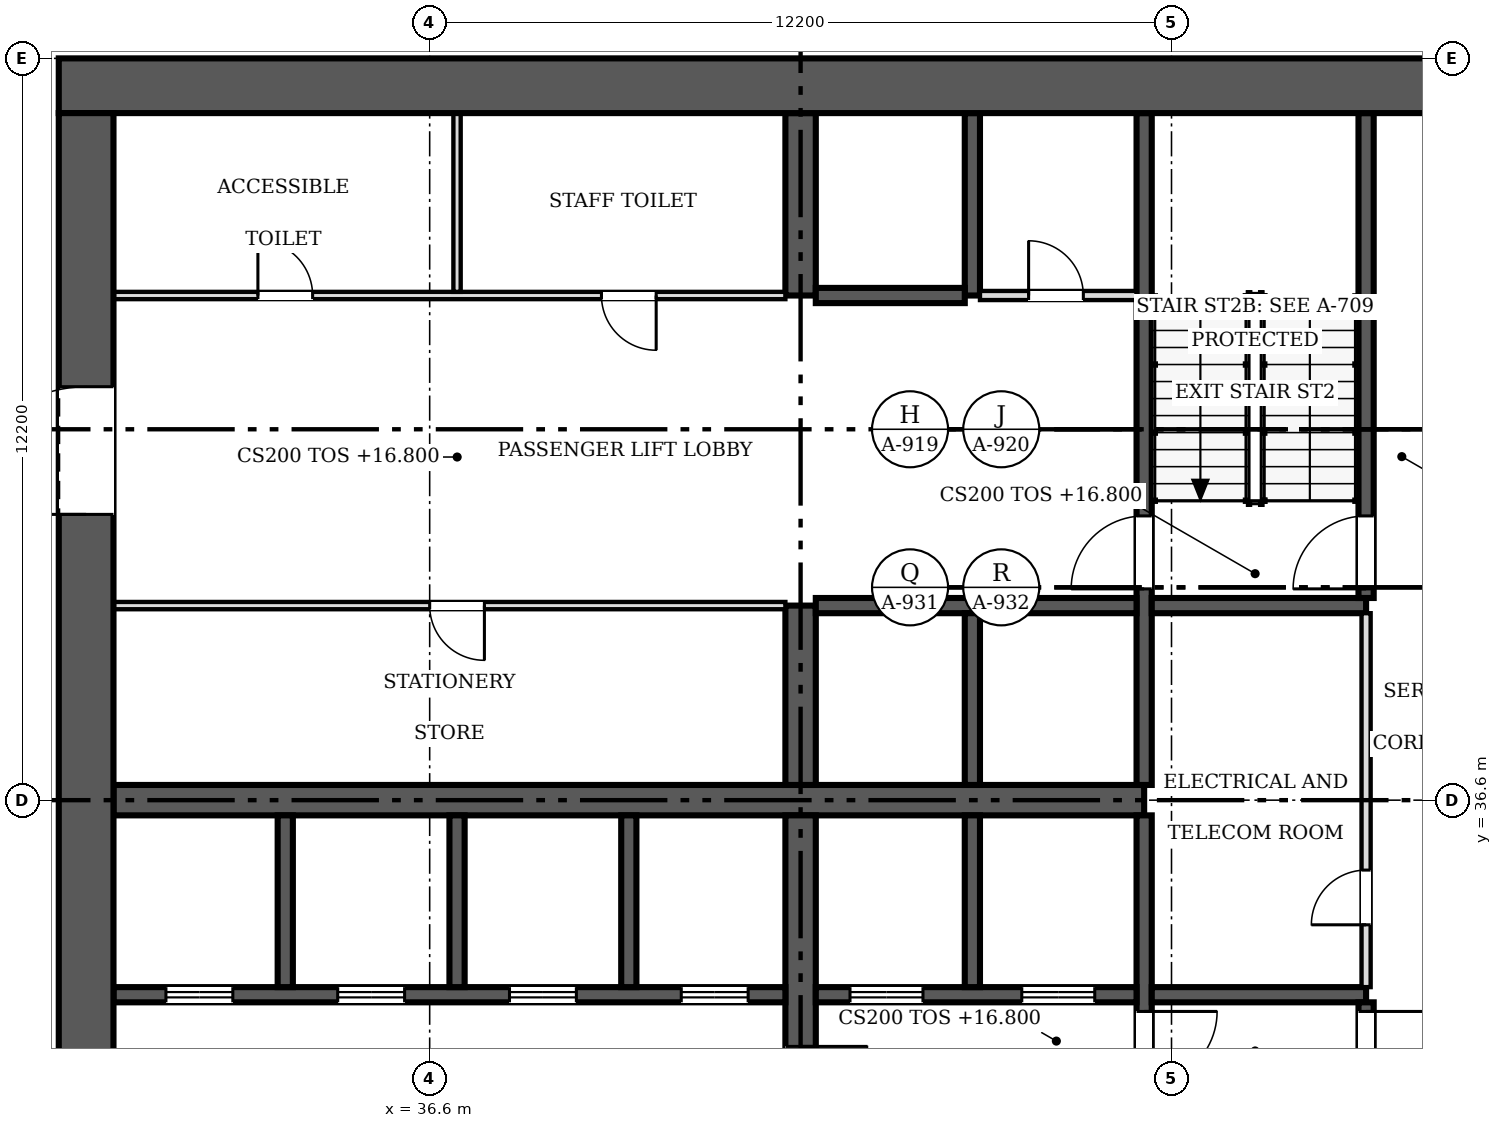
"""IFC4 building model, lengths in metres.
Left out: names, types, materials, properties, quantities, classifications, styles, units other than length and angle.
Written with IfcOpenShell. Run it as: python <this file> out.ifc"""

import sys

from ifc_helpers import new_model, si_unit, direction, frame, frame_2d, origin, place, context, subcontext, project, spatial, rectangle, extrude, source, transform, mapped, element, fill, save


model = new_model("IFC4")
c1 = context("Model", 3, precision=1e-05, world=origin(), true_north=direction((0.0, 1.0)))
c2 = subcontext(c1, "Body", "Model", "MODEL_VIEW")
j1 = project(units=[si_unit("LENGTHUNIT", "METRE"), si_unit("PLANEANGLEUNIT", "RADIAN")], contexts=[c1])
p1 = place(None, origin())
s1 = spatial("IfcSite", under=j1, at=p1, CompositionType="ELEMENT")
p2 = place(p1, origin())
s2 = spatial("IfcBuilding", under=s1, at=p2, CompositionType="ELEMENT")
p3 = place(p2, frame((0.0, 0.0, 16.8)))
s3 = spatial("IfcBuildingStorey", under=s2, at=p3, CompositionType="ELEMENT", Elevation=16.8)
p4 = place(p3, frame((30.95, 25.3, 0.0), z_axis=(0.0, 0.0, 1.0), x_axis=(0.0, 1.0, 0.0)))
e1 = element("IfcWall", 1, at=p4, inside=s3, PredefinedType="SHEAR", context=c2, shape_type="SweptSolid", body=[
    extrude(rectangle(XDim=22.6, YDim=0.9, at=frame_2d((11.3, 0.0))), origin(), (0.0, 0.0, 1.0), 4.5),
])
m1 = source(origin(), c2, "Body", "SweptSolid", [
    extrude(rectangle(XDim=2.1, YDim=2.4, at=frame_2d((1.05, 1.2))), frame((0.0, 0.46, 0.0), z_axis=(0.0, -1.0, 0.0), x_axis=(1.0, 0.0, 0.0)), (0.0, 0.0, 1.0), 0.92),
])
p5 = place(p4, frame((4.5, 0.0, 0.0)))
e2 = element("IfcOpeningElement", 2, at=p5, cuts=e1, PredefinedType="OPENING", context=c2, shape_type="MappedRepresentation", body=[
    mapped(m1, transform((0.0, 0.0, 0.0), scale=1.0)),
])
p6 = place(p4, frame((16.0, 0.0, 0.0)))
e3 = element("IfcOpeningElement", 3, at=p6, cuts=e1, PredefinedType="OPENING", context=c2, shape_type="MappedRepresentation", body=[
    mapped(m1, transform((0.0, 0.0, 0.0), scale=1.0)),
])
p7 = place(p3, frame((30.5, 48.35, 0.0), z_axis=(0.0, 0.0, 1.0), x_axis=(1.0, 0.0, 0.0)))
e4 = element("IfcWall", 4, at=p7, inside=s3, PredefinedType="SHEAR", context=c2, shape_type="SweptSolid", body=[
    extrude(rectangle(XDim=24.4, YDim=0.9, at=frame_2d((12.2, 0.0))), origin(), (0.0, 0.0, 1.0), 4.5),
])
p8 = place(p3, frame((31.4, 36.6, 0.0), z_axis=(0.0, 0.0, 1.0), x_axis=(1.0, 0.0, 0.0)))
e5 = element("IfcWall", 5, at=p8, inside=s3, PredefinedType="SHEAR", context=c2, shape_type="SweptSolid", body=[
    extrude(rectangle(XDim=16.95, YDim=0.5, at=frame_2d((8.475, 0.0))), origin(), (0.0, 0.0, 1.0), 4.5),
])
p9 = place(p3, frame((42.7, 36.35, 0.0), z_axis=(0.0, 0.0, 1.0), x_axis=(0.0, -1.0, 0.0)))
e6 = element("IfcWall", 6, at=p9, inside=s3, PredefinedType="SHEAR", context=c2, shape_type="SweptSolid", body=[
    extrude(rectangle(XDim=11.05, YDim=0.5, at=frame_2d((5.525, 0.0))), origin(), (0.0, 0.0, 1.0), 4.5),
])
m2 = source(origin(), c2, "Body", "SweptSolid", [
    extrude(rectangle(XDim=0.9, YDim=2.1, at=frame_2d((0.45, 1.05))), frame((0.0, 0.26, 0.0), z_axis=(0.0, -1.0, 0.0), x_axis=(1.0, 0.0, 0.0)), (0.0, 0.0, 1.0), 0.52),
])
p10 = place(p9, frame((6.5, 0.0, 0.0)))
e7 = element("IfcOpeningElement", 7, at=p10, cuts=e6, PredefinedType="OPENING", context=c2, shape_type="MappedRepresentation", body=[
    mapped(m2, transform((0.0, 0.0, 0.0), scale=1.0)),
])
m3 = source(origin(), c2, "Body", "SweptSolid", [
    extrude(rectangle(XDim=1.1, YDim=2.1, at=frame_2d((0.55, 1.05))), frame((0.0, 0.26, 0.0), z_axis=(0.0, -1.0, 0.0), x_axis=(1.0, 0.0, 0.0)), (0.0, 0.0, 1.0), 0.52),
])
p11 = place(p9, frame((3.8, 0.0, 0.0)))
e8 = element("IfcOpeningElement", 8, at=p11, cuts=e6, PredefinedType="OPENING", context=c2, shape_type="MappedRepresentation", body=[
    mapped(m3, transform((0.0, 0.0, 0.0), scale=1.0)),
])
p12 = place(p3, frame((42.7, 36.85, 0.0), z_axis=(0.0, 0.0, 1.0), x_axis=(0.0, 1.0, 0.0)))
e9 = element("IfcWall", 9, at=p12, inside=s3, PredefinedType="SHEAR", context=c2, shape_type="SweptSolid", body=[
    extrude(rectangle(XDim=2.95, YDim=0.5, at=frame_2d((1.475, 0.0))), origin(), (0.0, 0.0, 1.0), 4.5),
])
p13 = place(p3, frame((42.7, 44.9, 0.0), z_axis=(0.0, 0.0, 1.0), x_axis=(0.0, 1.0, 0.0)))
e10 = element("IfcWall", 10, at=p13, inside=s3, PredefinedType="SHEAR", context=c2, shape_type="SweptSolid", body=[
    extrude(rectangle(XDim=3.0, YDim=0.5, at=frame_2d((1.5, 0.0))), origin(), (0.0, 0.0, 1.0), 4.5),
])
p14 = place(p3, frame((48.35, 36.35, 0.0), z_axis=(0.0, 0.0, 1.0), x_axis=(0.0, -1.0, 0.0)))
e11 = element("IfcWall", 11, at=p14, inside=s3, PredefinedType="SOLIDWALL", context=c2, shape_type="SweptSolid", body=[
    extrude(rectangle(XDim=11.05, YDim=0.25, at=frame_2d((5.525, 0.0))), origin(), (0.0, 0.0, 1.0), 4.5),
])
m4 = source(origin(), c2, "Body", "SweptSolid", [
    extrude(rectangle(XDim=1.2, YDim=2.1, at=frame_2d((0.6, 1.05))), frame((0.0, 0.135, 0.0), z_axis=(0.0, -1.0, 0.0), x_axis=(1.0, 0.0, 0.0)), (0.0, 0.0, 1.0), 0.27),
])
p15 = place(p14, frame((3.225, 0.0, 0.0)))
e12 = element("IfcOpeningElement", 12, at=p15, cuts=e11, PredefinedType="OPENING", context=c2, shape_type="MappedRepresentation", body=[
    mapped(m4, transform((0.0, 0.0, 0.0), scale=1.0)),
])
p16 = place(p3, frame((48.35, 47.9, 0.0), z_axis=(0.0, 0.0, 1.0), x_axis=(0.0, -1.0, 0.0)))
e13 = element("IfcWall", 13, at=p16, inside=s3, PredefinedType="SOLIDWALL", context=c2, shape_type="SweptSolid", body=[
    extrude(rectangle(XDim=11.05, YDim=0.25, at=frame_2d((5.525, 0.0))), origin(), (0.0, 0.0, 1.0), 4.5),
])
p17 = place(p16, frame((6.625, 0.0, 0.0)))
e14 = element("IfcOpeningElement", 14, at=p17, cuts=e13, PredefinedType="OPENING", context=c2, shape_type="MappedRepresentation", body=[
    mapped(m4, transform((0.0, 0.0, 0.0), scale=1.0)),
])
p18 = place(p3, frame((42.45, 33.4, 0.0), z_axis=(0.0, 0.0, 1.0), x_axis=(-1.0, 0.0, 0.0)))
e15 = element("IfcWall", 15, at=p18, inside=s3, PredefinedType="SOLIDWALL", context=c2, shape_type="SweptSolid", body=[
    extrude(rectangle(XDim=11.05, YDim=0.25, at=frame_2d((5.525, 0.0))), origin(), (0.0, 0.0, 1.0), 4.5),
])
m5 = source(origin(), c2, "Body", "SweptSolid", [
    extrude(rectangle(XDim=1.1, YDim=2.1, at=frame_2d((0.55, 1.05))), frame((0.0, 0.135, 0.0), z_axis=(0.0, -1.0, 0.0), x_axis=(1.0, 0.0, 0.0)), (0.0, 0.0, 1.0), 0.27),
])
p19 = place(p18, frame((9.087, 0.0, 0.0)))
e16 = element("IfcOpeningElement", 16, at=p19, cuts=e15, PredefinedType="OPENING", context=c2, shape_type="MappedRepresentation", body=[
    mapped(m5, transform((0.0, 0.0, 0.0), scale=1.0)),
])
p20 = place(p18, frame((6.262, 0.0, 0.0)))
e17 = element("IfcOpeningElement", 17, at=p20, cuts=e15, PredefinedType="OPENING", context=c2, shape_type="MappedRepresentation", body=[
    mapped(m5, transform((0.0, 0.0, 0.0), scale=1.0)),
])
p21 = place(p18, frame((3.438, 0.0, 0.0)))
e18 = element("IfcOpeningElement", 18, at=p21, cuts=e15, PredefinedType="OPENING", context=c2, shape_type="MappedRepresentation", body=[
    mapped(m5, transform((0.0, 0.0, 0.0), scale=1.0)),
])
p22 = place(p18, frame((0.613, 0.0, 0.0)))
e19 = element("IfcOpeningElement", 19, at=p22, cuts=e15, PredefinedType="OPENING", context=c2, shape_type="MappedRepresentation", body=[
    mapped(m5, transform((0.0, 0.0, 0.0), scale=1.0)),
])
p23 = place(p3, frame((48.225, 33.4, 0.0), z_axis=(0.0, 0.0, 1.0), x_axis=(-1.0, 0.0, 0.0)))
e20 = element("IfcWall", 20, at=p23, inside=s3, PredefinedType="SOLIDWALL", context=c2, shape_type="SweptSolid", body=[
    extrude(rectangle(XDim=5.275, YDim=0.25, at=frame_2d((2.638, 0.0))), origin(), (0.0, 0.0, 1.0), 4.5),
])
p24 = place(p23, frame((3.512, 0.0, 0.0)))
e21 = element("IfcOpeningElement", 21, at=p24, cuts=e20, PredefinedType="OPENING", context=c2, shape_type="MappedRepresentation", body=[
    mapped(m4, transform((0.0, 0.0, 0.0), scale=1.0)),
])
p25 = place(p23, frame((0.688, 0.0, 0.0)))
e22 = element("IfcOpeningElement", 22, at=p25, cuts=e20, PredefinedType="OPENING", context=c2, shape_type="MappedRepresentation", body=[
    mapped(m4, transform((0.0, 0.0, 0.0), scale=1.0)),
])
p26 = place(p3, frame((48.475, 33.4, 0.0), z_axis=(0.0, 0.0, 1.0), x_axis=(1.0, 0.0, 0.0)))
e23 = element("IfcWall", 23, at=p26, inside=s3, PredefinedType="SOLIDWALL", context=c2, shape_type="SweptSolid", body=[
    extrude(rectangle(XDim=3.525, YDim=0.25, at=frame_2d((1.762, 0.0))), origin(), (0.0, 0.0, 1.0), 4.5),
])
p27 = place(p3, frame((42.95, 39.8, 0.0), z_axis=(0.0, 0.0, 1.0), x_axis=(1.0, 0.0, 0.0)))
e24 = element("IfcWall", 24, at=p27, inside=s3, PredefinedType="SOLIDWALL", context=c2, shape_type="SweptSolid", body=[
    extrude(rectangle(XDim=5.275, YDim=0.25, at=frame_2d((2.638, 0.0))), origin(), (0.0, 0.0, 1.0), 4.5),
])
p28 = place(p3, frame((48.475, 39.8, 0.0), z_axis=(0.0, 0.0, 1.0), x_axis=(1.0, 0.0, 0.0)))
e25 = element("IfcWall", 25, at=p28, inside=s3, PredefinedType="SOLIDWALL", context=c2, shape_type="SweptSolid", body=[
    extrude(rectangle(XDim=3.525, YDim=0.25, at=frame_2d((1.762, 0.0))), origin(), (0.0, 0.0, 1.0), 4.5),
])
p29 = place(p3, frame((52.0, 25.3, 0.0), z_axis=(0.0, 0.0, 1.0), x_axis=(0.0, 1.0, 0.0)))
e26 = element("IfcWall", 26, at=p29, inside=s3, PredefinedType="SOLIDWALL", context=c2, shape_type="SweptSolid", body=[
    extrude(rectangle(XDim=7.975, YDim=0.25, at=frame_2d((3.987, 0.0))), origin(), (0.0, 0.0, 1.0), 4.5),
])
p30 = place(p29, frame((6.625, 0.0, 0.0)))
e27 = element("IfcOpeningElement", 27, at=p30, cuts=e26, PredefinedType="OPENING", context=c2, shape_type="MappedRepresentation", body=[
    mapped(m4, transform((0.0, 0.0, 0.0), scale=1.0)),
])
p31 = place(p3, frame((52.0, 39.925, 0.0), z_axis=(0.0, 0.0, 1.0), x_axis=(0.0, 1.0, 0.0)))
e28 = element("IfcWall", 28, at=p31, inside=s3, PredefinedType="SOLIDWALL", context=c2, shape_type="SweptSolid", body=[
    extrude(rectangle(XDim=7.975, YDim=0.25, at=frame_2d((3.987, 0.0))), origin(), (0.0, 0.0, 1.0), 4.5),
])
p32 = place(p31, frame((0.15, 0.0, 0.0)))
e29 = element("IfcOpeningElement", 29, at=p32, cuts=e28, PredefinedType="OPENING", context=c2, shape_type="MappedRepresentation", body=[
    mapped(m4, transform((0.0, 0.0, 0.0), scale=1.0)),
])
p33 = place(p3, frame((45.525, 33.525, 0.0), z_axis=(0.0, 0.0, 1.0), x_axis=(0.0, 1.0, 0.0)))
e30 = element("IfcWall", 30, at=p33, inside=s3, PredefinedType="SOLIDWALL", context=c2, shape_type="SweptSolid", body=[
    extrude(rectangle(XDim=2.825, YDim=0.25, at=frame_2d((1.413, 0.0))), origin(), (0.0, 0.0, 1.0), 4.5),
])
p34 = place(p3, frame((45.525, 36.85, 0.0), z_axis=(0.0, 0.0, 1.0), x_axis=(0.0, 1.0, 0.0)))
e31 = element("IfcWall", 31, at=p34, inside=s3, PredefinedType="SOLIDWALL", context=c2, shape_type="SweptSolid", body=[
    extrude(rectangle(XDim=2.825, YDim=0.25, at=frame_2d((1.413, 0.0))), origin(), (0.0, 0.0, 1.0), 4.5),
])
for number, where, z_axis, x_axis in (
    (32, (34.225, 33.525, 0.0), (0.0, 0.0, 1.0), (0.0, 1.0, 0.0)),
    (33, (37.05, 33.525, 0.0), (0.0, 0.0, 1.0), (0.0, 1.0, 0.0)),
    (34, (39.875, 33.525, 0.0), (0.0, 0.0, 1.0), (0.0, 1.0, 0.0)),
):
    element("IfcWall", number, at=place(p3, frame(where, z_axis=z_axis, x_axis=x_axis)), inside=s3, PredefinedType="SOLIDWALL", context=c2, shape_type="SweptSolid", body=[
        extrude(rectangle(XDim=2.825, YDim=0.25, at=frame_2d((1.413, 0.0))), origin(), (0.0, 0.0, 1.0), 4.5),
    ])
p35 = place(p3, frame((45.525, 44.9, 0.0), z_axis=(0.0, 0.0, 1.0), x_axis=(0.0, 1.0, 0.0)))
e35 = element("IfcWall", 35, at=p35, inside=s3, PredefinedType="SOLIDWALL", context=c2, shape_type="SweptSolid", body=[
    extrude(rectangle(XDim=3.0, YDim=0.25, at=frame_2d((1.5, 0.0))), origin(), (0.0, 0.0, 1.0), 4.5),
])
p36 = place(p3, frame((42.95, 44.9, 0.0), z_axis=(0.0, 0.0, 1.0), x_axis=(1.0, 0.0, 0.0)))
e36 = element("IfcWall", 36, at=p36, inside=s3, PredefinedType="SOLIDWALL", context=c2, shape_type="SweptSolid", body=[
    extrude(rectangle(XDim=2.45, YDim=0.25, at=frame_2d((1.225, 0.0))), origin(), (0.0, 0.0, 1.0), 4.5),
])
p37 = place(p3, frame((42.45, 39.8, 0.0), z_axis=(0.0, 0.0, 1.0), x_axis=(-1.0, 0.0, 0.0)))
e37 = element("IfcWall", 37, at=p37, inside=s3, PredefinedType="PARTITIONING", context=c2, shape_type="SweptSolid", body=[
    extrude(rectangle(XDim=11.05, YDim=0.12, at=frame_2d((5.525, 0.0))), origin(), (0.0, 0.0, 1.0), 4.3),
])
m6 = source(origin(), c2, "Body", "SweptSolid", [
    extrude(rectangle(XDim=0.9, YDim=2.1, at=frame_2d((0.45, 1.05))), frame((0.0, 0.07, 0.0), z_axis=(0.0, -1.0, 0.0), x_axis=(1.0, 0.0, 0.0)), (0.0, 0.0, 1.0), 0.14),
])
p38 = place(p37, frame((4.95, 0.0, 0.0)))
e38 = element("IfcOpeningElement", 38, at=p38, cuts=e37, PredefinedType="OPENING", context=c2, shape_type="MappedRepresentation", body=[
    mapped(m6, transform((0.0, 0.0, 0.0), scale=1.0)),
])
p39 = place(p3, frame((31.4, 44.9, 0.0), z_axis=(0.0, 0.0, 1.0), x_axis=(1.0, 0.0, 0.0)))
e39 = element("IfcWall", 39, at=p39, inside=s3, PredefinedType="PARTITIONING", context=c2, shape_type="SweptSolid", body=[
    extrude(rectangle(XDim=11.05, YDim=0.12, at=frame_2d((5.525, 0.0))), origin(), (0.0, 0.0, 1.0), 4.3),
])
p40 = place(p39, frame((2.375, 0.0, 0.0)))
e40 = element("IfcOpeningElement", 40, at=p40, cuts=e39, PredefinedType="OPENING", context=c2, shape_type="MappedRepresentation", body=[
    mapped(m6, transform((0.0, 0.0, 0.0), scale=1.0)),
])
p41 = place(p39, frame((8.025, 0.0, 0.0)))
e41 = element("IfcOpeningElement", 41, at=p41, cuts=e39, PredefinedType="OPENING", context=c2, shape_type="MappedRepresentation", body=[
    mapped(m6, transform((0.0, 0.0, 0.0), scale=1.0)),
])
p42 = place(p3, frame((52.0, 33.525, 0.0), z_axis=(0.0, 0.0, 1.0), x_axis=(0.0, 1.0, 0.0)))
e42 = element("IfcWall", 42, at=p42, inside=s3, PredefinedType="PARTITIONING", context=c2, shape_type="SweptSolid", body=[
    extrude(rectangle(XDim=6.15, YDim=0.15, at=frame_2d((3.075, 0.0))), origin(), (0.0, 0.0, 1.0), 4.3),
])
m7 = source(origin(), c2, "Body", "SweptSolid", [
    extrude(rectangle(XDim=0.9, YDim=2.1, at=frame_2d((0.45, 1.05))), frame((0.0, 0.085, 0.0), z_axis=(0.0, -1.0, 0.0), x_axis=(1.0, 0.0, 0.0)), (0.0, 0.0, 1.0), 0.17),
])
p43 = place(p42, frame((1.025, 0.0, 0.0)))
e43 = element("IfcOpeningElement", 43, at=p43, cuts=e42, PredefinedType="OPENING", context=c2, shape_type="MappedRepresentation", body=[
    mapped(m7, transform((0.0, 0.0, 0.0), scale=1.0)),
])
p44 = place(p3, frame((37.05, 44.96, 0.0), z_axis=(0.0, 0.0, 1.0), x_axis=(0.0, 1.0, 0.0)))
e44 = element("IfcWall", 44, at=p44, inside=s3, PredefinedType="PARTITIONING", context=c2, shape_type="SweptSolid", body=[
    extrude(rectangle(XDim=2.94, YDim=0.12, at=frame_2d((1.47, 0.0))), origin(), (0.0, 0.0, 1.0), 4.3),
])
p45 = place(p3, frame((45.65, 44.9, 0.0), z_axis=(0.0, 0.0, 1.0), x_axis=(1.0, 0.0, 0.0)))
e45 = element("IfcWall", 45, at=p45, inside=s3, PredefinedType="PARTITIONING", context=c2, shape_type="SweptSolid", body=[
    extrude(rectangle(XDim=2.575, YDim=0.15, at=frame_2d((1.288, 0.0))), origin(), (0.0, 0.0, 1.0), 4.3),
])
p46 = place(p45, frame((0.8, 0.0, 0.0)))
e46 = element("IfcOpeningElement", 46, at=p46, cuts=e45, PredefinedType="OPENING", context=c2, shape_type="MappedRepresentation", body=[
    mapped(m7, transform((0.0, 0.0, 0.0), scale=1.0)),
])
m8 = source(origin(), c2, "Body", "SweptSolid", [
    extrude(rectangle(XDim=2.1, YDim=2.4, at=frame_2d((1.05, 1.2))), frame((0.0, 0.025, 0.0), z_axis=(0.0, -1.0, 0.0), x_axis=(1.0, 0.0, 0.0)), (0.0, 0.0, 1.0), 0.05),
])
p47 = place(p6, origin())
e47 = element("IfcDoor", 47, at=p47, inside=s3, OperationType="DOUBLE_DOOR_SINGLE_SWING", PredefinedType="DOOR", context=c2, shape_type="MappedRepresentation", body=[
    mapped(m8, transform((0.0, 0.0, 0.0), scale=1.0)),
])
fill(e3, e47)
m9 = source(origin(), c2, "Body", "SweptSolid", [
    extrude(rectangle(XDim=1.1, YDim=2.1, at=frame_2d((0.55, 1.05))), frame((0.0, 0.025, 0.0), z_axis=(0.0, -1.0, 0.0), x_axis=(1.0, 0.0, 0.0)), (0.0, 0.0, 1.0), 0.05),
])
p48 = place(p11, origin())
e48 = element("IfcDoor", 48, at=p48, inside=s3, OperationType="SINGLE_SWING_LEFT", PredefinedType="DOOR", context=c2, shape_type="MappedRepresentation", body=[
    mapped(m9, transform((0.0, 0.0, 0.0), scale=1.0)),
])
fill(e8, e48)
m10 = source(origin(), c2, "Body", "SweptSolid", [
    extrude(rectangle(XDim=1.2, YDim=2.1, at=frame_2d((0.6, 1.05))), frame((0.0, 0.025, 0.0), z_axis=(0.0, -1.0, 0.0), x_axis=(1.0, 0.0, 0.0)), (0.0, 0.0, 1.0), 0.05),
])
p49 = place(p15, origin())
e49 = element("IfcDoor", 49, at=p49, inside=s3, OperationType="SINGLE_SWING_LEFT", PredefinedType="DOOR", context=c2, shape_type="MappedRepresentation", body=[
    mapped(m10, transform((0.0, 0.0, 0.0), scale=1.0)),
])
fill(e12, e49)
p50 = place(p17, origin())
e50 = element("IfcDoor", 50, at=p50, inside=s3, OperationType="SINGLE_SWING_RIGHT", PredefinedType="DOOR", context=c2, shape_type="MappedRepresentation", body=[
    mapped(m10, transform((0.0, 0.0, 0.0), scale=1.0)),
])
fill(e14, e50)
p51 = place(p19, origin())
e51 = element("IfcDoor", 51, at=p51, inside=s3, OperationType="DOUBLE_DOOR_SLIDING", PredefinedType="DOOR", context=c2, shape_type="MappedRepresentation", body=[
    mapped(m9, transform((0.0, 0.0, 0.0), scale=1.0)),
])
fill(e16, e51)
p52 = place(p20, origin())
e52 = element("IfcDoor", 52, at=p52, inside=s3, OperationType="DOUBLE_DOOR_SLIDING", PredefinedType="DOOR", context=c2, shape_type="MappedRepresentation", body=[
    mapped(m9, transform((0.0, 0.0, 0.0), scale=1.0)),
])
fill(e17, e52)
p53 = place(p21, origin())
e53 = element("IfcDoor", 53, at=p53, inside=s3, OperationType="DOUBLE_DOOR_SLIDING", PredefinedType="DOOR", context=c2, shape_type="MappedRepresentation", body=[
    mapped(m9, transform((0.0, 0.0, 0.0), scale=1.0)),
])
fill(e18, e53)
p54 = place(p22, origin())
e54 = element("IfcDoor", 54, at=p54, inside=s3, OperationType="DOUBLE_DOOR_SLIDING", PredefinedType="DOOR", context=c2, shape_type="MappedRepresentation", body=[
    mapped(m9, transform((0.0, 0.0, 0.0), scale=1.0)),
])
fill(e19, e54)
p55 = place(p24, origin())
e55 = element("IfcDoor", 55, at=p55, inside=s3, OperationType="DOUBLE_DOOR_SLIDING", PredefinedType="DOOR", context=c2, shape_type="MappedRepresentation", body=[
    mapped(m10, transform((0.0, 0.0, 0.0), scale=1.0)),
])
fill(e21, e55)
p56 = place(p25, origin())
e56 = element("IfcDoor", 56, at=p56, inside=s3, OperationType="DOUBLE_DOOR_SLIDING", PredefinedType="DOOR", context=c2, shape_type="MappedRepresentation", body=[
    mapped(m10, transform((0.0, 0.0, 0.0), scale=1.0)),
])
fill(e22, e56)
p57 = place(p30, origin())
e57 = element("IfcDoor", 57, at=p57, inside=s3, OperationType="SINGLE_SWING_RIGHT", PredefinedType="DOOR", context=c2, shape_type="MappedRepresentation", body=[
    mapped(m10, transform((0.0, 0.0, 0.0), scale=1.0)),
])
fill(e27, e57)
p58 = place(p32, origin())
e58 = element("IfcDoor", 58, at=p58, inside=s3, OperationType="SINGLE_SWING_LEFT", PredefinedType="DOOR", context=c2, shape_type="MappedRepresentation", body=[
    mapped(m10, transform((0.0, 0.0, 0.0), scale=1.0)),
])
fill(e29, e58)
m11 = source(origin(), c2, "Body", "SweptSolid", [
    extrude(rectangle(XDim=0.9, YDim=2.1, at=frame_2d((0.45, 1.05))), frame((0.0, 0.025, 0.0), z_axis=(0.0, -1.0, 0.0), x_axis=(1.0, 0.0, 0.0)), (0.0, 0.0, 1.0), 0.05),
])
p59 = place(p38, origin())
e59 = element("IfcDoor", 59, at=p59, inside=s3, OperationType="SINGLE_SWING_LEFT", PredefinedType="DOOR", context=c2, shape_type="MappedRepresentation", body=[
    mapped(m11, transform((0.0, 0.0, 0.0), scale=1.0)),
])
fill(e38, e59)
p60 = place(p40, origin())
e60 = element("IfcDoor", 60, at=p60, inside=s3, OperationType="SINGLE_SWING_LEFT", PredefinedType="DOOR", context=c2, shape_type="MappedRepresentation", body=[
    mapped(m11, transform((0.0, 0.0, 0.0), scale=1.0)),
])
fill(e40, e60)
p61 = place(p41, origin())
e61 = element("IfcDoor", 61, at=p61, inside=s3, OperationType="SINGLE_SWING_RIGHT", PredefinedType="DOOR", context=c2, shape_type="MappedRepresentation", body=[
    mapped(m11, transform((0.0, 0.0, 0.0), scale=1.0)),
])
fill(e41, e61)
p62 = place(p43, origin())
e62 = element("IfcDoor", 62, at=p62, inside=s3, OperationType="SINGLE_SWING_LEFT", PredefinedType="DOOR", context=c2, shape_type="MappedRepresentation", body=[
    mapped(m11, transform((0.0, 0.0, 0.0), scale=1.0)),
])
fill(e43, e62)
p63 = place(p46, origin())
e63 = element("IfcDoor", 63, at=p63, inside=s3, OperationType="SINGLE_SWING_LEFT", PredefinedType="DOOR", context=c2, shape_type="MappedRepresentation", body=[
    mapped(m11, transform((0.0, 0.0, 0.0), scale=1.0)),
])
fill(e46, e63)
save(model, sys.argv[1])
